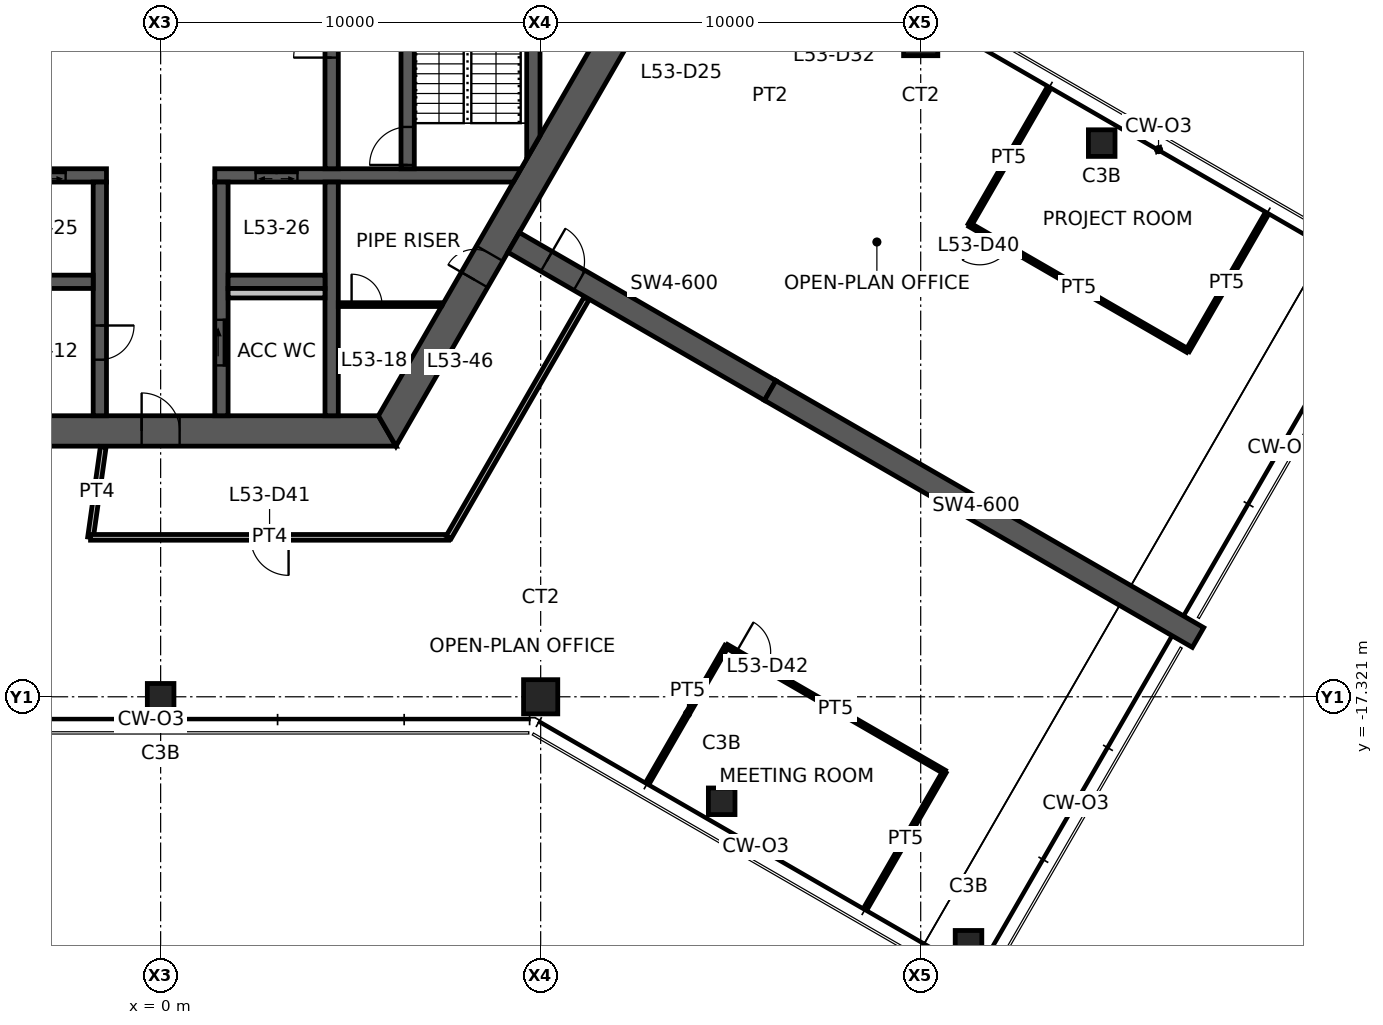
"""IFC4 building model, lengths in metres.
Left out: names, types, materials, properties, quantities, classifications, styles, units other than length and angle.
Written with IfcOpenShell. Run it as: python <this file> out.ifc"""

import sys

from ifc_helpers import new_model, si_unit, direction, frame, frame_2d, origin, origin_2d, place, context, subcontext, project, spatial, polyline, rectangle, hollow_rectangle, outline, extrude, element, fill, save


model = new_model("IFC4")
c1 = context("Model", 3, precision=1e-05, world=origin(), true_north=direction((0.0, 1.0)))
c2 = subcontext(c1, "Body", "Model", "MODEL_VIEW")
j1 = project(units=[si_unit("LENGTHUNIT", "METRE"), si_unit("PLANEANGLEUNIT", "RADIAN")], contexts=[c1])
p1 = place(None, origin())
s1 = spatial("IfcSite", under=j1, at=p1, CompositionType="ELEMENT")
p2 = place(p1, origin())
s2 = spatial("IfcBuilding", under=s1, at=p2, CompositionType="ELEMENT")
p3 = place(p2, frame((0.0, 0.0, 212.8)))
s3 = spatial("IfcBuildingStorey", under=s2, at=p3, CompositionType="ELEMENT", Elevation=212.8)
for number, where, z_axis, x_axis in (
    (1, (20.0, 0.0, 0.0), (0.0, 0.0, 1.0), (1.0, 0.0, 0.0)),
    (2, (10.0, -17.321, 0.0), (0.0, 0.0, 1.0), (1.0, 0.0, 0.0)),
):
    element("IfcColumn", number, at=place(p3, frame(where, z_axis=z_axis, x_axis=x_axis)), inside=s3, PredefinedType="COLUMN", context=c2, shape_type="SweptSolid", body=[
        extrude(hollow_rectangle(XDim=0.9, YDim=0.9, WallThickness=0.09, at=origin_2d()), origin(), (0.0, 0.0, 1.0), 3.9),
    ])
for number, where, z_axis, x_axis in (
    (3, (0.0, -17.321, 0.0), (0.0, 0.0, 1.0), (1.0, 0.0, 0.0)),
    (4, (14.763, -20.071, 0.0), (0.0, 0.0, 1.0), (1.0, 0.0, 0.0)),
    (5, (21.258, -23.821, 0.0), (0.0, 0.0, 1.0), (1.0, 0.0, 0.0)),
    (6, (24.763, -2.75, 0.0), (0.0, 0.0, 1.0), (1.0, 0.0, 0.0)),
):
    element("IfcColumn", number, at=place(p3, frame(where, z_axis=z_axis, x_axis=x_axis)), inside=s3, PredefinedType="COLUMN", context=c2, shape_type="SweptSolid", body=[
        extrude(hollow_rectangle(XDim=0.7, YDim=0.7, WallThickness=0.036, at=origin_2d()), origin(), (0.0, 0.0, 1.0), 3.9),
    ])
p4 = place(p3, frame((-5.961, -10.325, 0.0), z_axis=(0.0, 0.0, 1.0), x_axis=(1.0, 0.0, 0.0)))
e7 = element("IfcWall", 7, at=p4, inside=s3, PredefinedType="SHEAR", context=c2, shape_type="SweptSolid", body=[
    extrude(outline(polyline([(-0.231, -0.4), (5.461, -0.4), (6.461, -0.4), (12.153, -0.4), (11.691, 0.4), (6.461, 0.4), (5.461, 0.4), (0.231, 0.4), (-0.231, -0.4)])), origin(), (0.0, 0.0, 1.0), 3.9),
])
p5 = place(p4, frame((5.461, 0.0, 0.0)))
e8 = element("IfcOpeningElement", 8, at=p5, cuts=e7, PredefinedType="OPENING", context=c2, shape_type="SweptSolid", body=[
    extrude(rectangle(XDim=1.0, YDim=2.1, at=frame_2d((0.5, 1.05))), frame((0.0, 0.41, 0.0), z_axis=(0.0, -1.0, 0.0), x_axis=(1.0, 0.0, 0.0)), (0.0, 0.0, 1.0), 0.82),
])
p6 = place(p3, frame((5.961, -10.325, 0.0), z_axis=(0.0, 0.0, 1.0), x_axis=(0.500004296715, 0.866022923061, 0.0)))
e9 = element("IfcWall", 9, at=p6, inside=s3, PredefinedType="SHEAR", context=c2, shape_type="SweptSolid", body=[
    extrude(outline(polyline([(-0.231, -0.4), (4.594, -0.4), (5.394, -0.4), (12.153, -0.4), (11.691, 0.4), (5.394, 0.4), (4.594, 0.4), (0.231, 0.4), (-0.231, -0.4)])), origin(), (0.0, 0.0, 1.0), 3.9),
])
p7 = place(p6, frame((4.594, 0.0, 0.0)))
e10 = element("IfcOpeningElement", 10, at=p7, cuts=e9, PredefinedType="OPENING", context=c2, shape_type="SweptSolid", body=[
    extrude(rectangle(XDim=0.8, YDim=2.1, at=frame_2d((0.4, 1.05))), frame((0.0, 0.41, 0.0), z_axis=(0.0, -1.0, 0.0), x_axis=(1.0, 0.0, 0.0)), (0.0, 0.0, 1.0), 0.82),
])
p8 = place(p3, frame((9.288, -5.363, 0.0), z_axis=(0.0, 0.0, 1.0), x_axis=(0.866031736626, -0.499989031036, 0.0)))
e11 = element("IfcWall", 11, at=p8, inside=s3, PredefinedType="SHEAR", context=c2, shape_type="SweptSolid", body=[
    extrude(rectangle(XDim=7.796, YDim=0.6, at=frame_2d((3.898, 0.0))), origin(), (0.0, 0.0, 1.0), 3.9),
])
p9 = place(p8, frame((1.0, 0.0, 0.0)))
e12 = element("IfcOpeningElement", 12, at=p9, cuts=e11, PredefinedType="OPENING", context=c2, shape_type="SweptSolid", body=[
    extrude(rectangle(XDim=1.0, YDim=2.1, at=frame_2d((0.5, 1.05))), frame((0.0, 0.31, 0.0), z_axis=(0.0, -1.0, 0.0), x_axis=(1.0, 0.0, 0.0)), (0.0, 0.0, 1.0), 0.62),
])
p10 = place(p3, frame((16.039, -9.26, 0.0), z_axis=(0.0, 0.0, 1.0), x_axis=(0.866024837091, -0.50000098154, 0.0)))
e13 = element("IfcWall", 13, at=p10, inside=s3, PredefinedType="SHEAR", context=c2, shape_type="SweptSolid", body=[
    extrude(rectangle(XDim=13.0, YDim=0.6, at=frame_2d((6.5, 0.0))), origin(), (0.0, 0.0, 1.0), 3.9),
])
p11 = place(p3, frame((-9.382, -3.6, 0.0), z_axis=(0.0, 0.0, 1.0), x_axis=(1.0, 0.0, 0.0)))
e14 = element("IfcWall", 14, at=p11, inside=s3, PredefinedType="SHEAR", context=c2, shape_type="SweptSolid", body=[
    extrude(outline(polyline([(0.101, -0.175), (3.232, -0.175), (4.532, -0.175), (5.782, -0.175), (6.882, -0.175), (7.957, -0.175), (7.957, 0.175), (6.882, 0.175), (5.782, 0.175), (4.532, 0.175), (3.232, 0.175), (-0.101, 0.175), (0.101, -0.175)])), origin(), (0.0, 0.0, 1.0), 3.9),
])
p12 = place(p11, frame((5.782, 0.0, 0.0)))
e15 = element("IfcOpeningElement", 15, at=p12, cuts=e14, PredefinedType="OPENING", context=c2, shape_type="SweptSolid", body=[
    extrude(rectangle(XDim=1.1, YDim=2.1, at=frame_2d((0.55, 1.05))), frame((0.0, 0.185, 0.0), z_axis=(0.0, -1.0, 0.0), x_axis=(1.0, 0.0, 0.0)), (0.0, 0.0, 1.0), 0.37),
])
p13 = place(p11, frame((3.232, 0.0, 0.0)))
e16 = element("IfcOpeningElement", 16, at=p13, cuts=e14, PredefinedType="OPENING", context=c2, shape_type="SweptSolid", body=[
    extrude(rectangle(XDim=1.3, YDim=2.1, at=frame_2d((0.65, 1.05))), frame((0.0, 0.185, 0.0), z_axis=(0.0, -1.0, 0.0), x_axis=(1.0, 0.0, 0.0)), (0.0, 0.0, 1.0), 0.37),
])
p14 = place(p3, frame((1.425, -3.6, 0.0), z_axis=(0.0, 0.0, 1.0), x_axis=(1.0, 0.0, 0.0)))
e17 = element("IfcWall", 17, at=p14, inside=s3, PredefinedType="SHEAR", context=c2, shape_type="SweptSolid", body=[
    extrude(outline(polyline([(0.0, -0.175), (1.075, -0.175), (2.175, -0.175), (7.856, -0.175), (8.058, 0.175), (2.175, 0.175), (1.075, 0.175), (0.0, 0.175), (0.0, -0.175)])), origin(), (0.0, 0.0, 1.0), 3.9),
])
p15 = place(p14, frame((1.075, 0.0, 0.0)))
e18 = element("IfcOpeningElement", 18, at=p15, cuts=e17, PredefinedType="OPENING", context=c2, shape_type="SweptSolid", body=[
    extrude(rectangle(XDim=1.1, YDim=2.1, at=frame_2d((0.55, 1.05))), frame((0.0, 0.185, 0.0), z_axis=(0.0, -1.0, 0.0), x_axis=(1.0, 0.0, 0.0)), (0.0, 0.0, 1.0), 0.37),
])
p16 = place(p3, frame((-1.6, -3.775, 0.0), z_axis=(0.0, 0.0, 1.0), x_axis=(0.0, -1.0, 0.0)))
e19 = element("IfcWall", 19, at=p16, inside=s3, PredefinedType="SHEAR", context=c2, shape_type="SweptSolid", body=[
    extrude(rectangle(XDim=6.15, YDim=0.35, at=frame_2d((3.075, 0.0))), origin(), (0.0, 0.0, 1.0), 3.9),
])
p17 = place(p16, frame((3.775, 0.0, 0.0)))
e20 = element("IfcOpeningElement", 20, at=p17, cuts=e19, PredefinedType="OPENING", context=c2, shape_type="SweptSolid", body=[
    extrude(rectangle(XDim=0.9, YDim=2.1, at=frame_2d((0.45, 1.05))), frame((0.0, 0.185, 0.0), z_axis=(0.0, -1.0, 0.0), x_axis=(1.0, 0.0, 0.0)), (0.0, 0.0, 1.0), 0.37),
])
p18 = place(p3, frame((1.6, -3.775, 0.0), z_axis=(0.0, 0.0, 1.0), x_axis=(0.0, -1.0, 0.0)))
e21 = element("IfcWall", 21, at=p18, inside=s3, PredefinedType="SHEAR", context=c2, shape_type="SweptSolid", body=[
    extrude(rectangle(XDim=6.15, YDim=0.35, at=frame_2d((3.075, 0.0))), origin(), (0.0, 0.0, 1.0), 3.9),
])
p19 = place(p18, frame((3.625, 0.0, 0.0)))
e22 = element("IfcOpeningElement", 22, at=p19, cuts=e21, PredefinedType="OPENING", context=c2, shape_type="SweptSolid", body=[
    extrude(rectangle(XDim=1.2, YDim=2.1, at=frame_2d((0.6, 1.05))), frame((0.0, 0.185, 0.0), z_axis=(0.0, -1.0, 0.0), x_axis=(1.0, 0.0, 0.0)), (0.0, 0.0, 1.0), 0.37),
])
p20 = place(p3, frame((4.5, -3.425, 0.0), z_axis=(0.0, 0.0, 1.0), x_axis=(0.0, 1.0, 0.0)))
e23 = element("IfcWall", 23, at=p20, inside=s3, PredefinedType="SHEAR", context=c2, shape_type="SweptSolid", body=[
    extrude(rectangle(XDim=6.85, YDim=0.35, at=frame_2d((3.425, 0.0))), origin(), (0.0, 0.0, 1.0), 3.9),
])
p21 = place(p20, frame((2.925, 0.0, 0.0)))
e24 = element("IfcOpeningElement", 24, at=p21, cuts=e23, PredefinedType="OPENING", context=c2, shape_type="SweptSolid", body=[
    extrude(rectangle(XDim=1.0, YDim=2.1, at=frame_2d((0.5, 1.05))), frame((0.0, 0.185, 0.0), z_axis=(0.0, -1.0, 0.0), x_axis=(1.0, 0.0, 0.0)), (0.0, 0.0, 1.0), 0.37),
])
p22 = place(p3, frame((6.5, -3.425, 0.0), z_axis=(0.0, 0.0, 1.0), x_axis=(0.0, 1.0, 0.0)))
e25 = element("IfcWall", 25, at=p22, inside=s3, PredefinedType="SHEAR", context=c2, shape_type="SweptSolid", body=[
    extrude(rectangle(XDim=6.85, YDim=0.35, at=frame_2d((3.425, 0.0))), origin(), (0.0, 0.0, 1.0), 3.9),
])
p23 = place(p22, frame((0.1, 0.0, 0.0)))
e26 = element("IfcOpeningElement", 26, at=p23, cuts=e25, PredefinedType="OPENING", context=c2, shape_type="SweptSolid", body=[
    extrude(rectangle(XDim=1.0, YDim=2.1, at=frame_2d((0.5, 1.05))), frame((0.0, 0.185, 0.0), z_axis=(0.0, -1.0, 0.0), x_axis=(1.0, 0.0, 0.0)), (0.0, 0.0, 1.0), 0.37),
])
p24 = place(p3, frame((4.5, -3.775, 0.0), z_axis=(0.0, 0.0, 1.0), x_axis=(0.0, -1.0, 0.0)))
e27 = element("IfcWall", 27, at=p24, inside=s3, PredefinedType="SHEAR", context=c2, shape_type="SweptSolid", body=[
    extrude(rectangle(XDim=6.15, YDim=0.35, at=frame_2d((3.075, 0.0))), origin(), (0.0, 0.0, 1.0), 3.9),
])
for number, where, z_axis, x_axis in (
    (28, (-4.325, -6.4, 0.0), (0.0, 0.0, 1.0), (1.0, 0.0, 0.0)),
    (29, (1.775, -6.4, 0.0), (0.0, 0.0, 1.0), (1.0, 0.0, 0.0)),
):
    element("IfcWall", number, at=place(p3, frame(where, z_axis=z_axis, x_axis=x_axis)), inside=s3, PredefinedType="SHEAR", context=c2, shape_type="SweptSolid", body=[
        extrude(rectangle(XDim=2.55, YDim=0.35, at=frame_2d((1.275, 0.0))), origin(), (0.0, 0.0, 1.0), 3.9),
    ])
p25 = place(p3, frame((9.808, -2.862, 0.0), z_axis=(0.0, 0.0, 1.0), x_axis=(0.0, 1.0, 0.0)))
e30 = element("IfcWall", 30, at=p25, inside=s3, PredefinedType="SHEAR", context=c2, shape_type="SweptSolid", body=[
    extrude(outline(polyline([(0.303, -0.175), (5.421, -0.175), (6.028, 0.175), (-0.303, 0.175), (0.303, -0.175)])), origin(), (0.0, 0.0, 1.0), 3.9),
])
p26 = place(p3, frame((1.775, -6.7, 0.0), z_axis=(0.0, 0.0, 1.0), x_axis=(1.0, 0.0, 0.0)))
e31 = element("IfcWall", 31, at=p26, inside=s3, PredefinedType="PLUMBINGWALL", context=c2, shape_type="SweptSolid", body=[
    extrude(rectangle(XDim=2.55, YDim=0.25, at=frame_2d((1.275, 0.0))), origin(), (0.0, 0.0, 1.0), 3.9),
])
p27 = place(p3, frame((4.675, -7.0, 0.0), z_axis=(0.0, 0.0, 1.0), x_axis=(1.0, 0.0, 0.0)))
e32 = element("IfcWall", 32, at=p27, inside=s3, PredefinedType="PARTITIONING", context=c2, shape_type="SweptSolid", body=[
    extrude(outline(polyline([(0.0, -0.05), (0.35, -0.05), (1.15, -0.05), (2.715, -0.05), (2.744, 0.0), (2.75, 0.05), (1.15, 0.05), (0.35, 0.05), (0.0, 0.05), (0.0, -0.05)])), origin(), (0.0, 0.0, 1.0), 2.95),
])
p28 = place(p27, frame((0.35, 0.0, 0.0)))
e33 = element("IfcOpeningElement", 33, at=p28, cuts=e32, PredefinedType="OPENING", context=c2, shape_type="SweptSolid", body=[
    extrude(rectangle(XDim=0.8, YDim=2.1, at=frame_2d((0.4, 1.05))), frame((0.0, 0.06, 0.0), z_axis=(0.0, -1.0, 0.0), x_axis=(1.0, 0.0, 0.0)), (0.0, 0.0, 1.0), 0.12),
])
p29 = place(p3, frame((21.292, -4.903, 0.0), z_axis=(0.0, 0.0, 1.0), x_axis=(0.500000428765, 0.866025156237, 0.0)))
e34 = element("IfcWall", 34, at=p29, inside=s3, PredefinedType="PARTITIONING", context=c2, shape_type="SweptSolid", body=[
    extrude(rectangle(XDim=4.08, YDim=0.1, at=frame_2d((2.04, 0.0))), origin(), (0.0, 0.0, 1.0), 2.95),
])
p30 = place(p3, frame((27.025, -8.213, 0.0), z_axis=(0.0, 0.0, 1.0), x_axis=(-0.866021597574, 0.500006592492, 0.0)))
e35 = element("IfcWall", 35, at=p30, inside=s3, PredefinedType="PARTITIONING", context=c2, shape_type="SweptSolid", body=[
    extrude(rectangle(XDim=6.62, YDim=0.1, at=frame_2d((3.31, 0.0))), origin(), (0.0, 0.0, 1.0), 2.95),
])
p31 = place(p30, frame((5.42, 0.0, 0.0)))
e36 = element("IfcOpeningElement", 36, at=p31, cuts=e35, PredefinedType="OPENING", context=c2, shape_type="SweptSolid", body=[
    extrude(rectangle(XDim=0.9, YDim=2.1, at=frame_2d((0.45, 1.05))), frame((0.0, 0.06, 0.0), z_axis=(0.0, -1.0, 0.0), x_axis=(1.0, 0.0, 0.0)), (0.0, 0.0, 1.0), 0.12),
])
p32 = place(p3, frame((29.08, -4.653, 0.0), z_axis=(0.0, 0.0, 1.0), x_axis=(-0.500010383074, -0.866019409031, 0.0)))
e37 = element("IfcWall", 37, at=p32, inside=s3, PredefinedType="PARTITIONING", context=c2, shape_type="SweptSolid", body=[
    extrude(rectangle(XDim=4.11, YDim=0.1, at=frame_2d((2.055, 0.0))), origin(), (0.0, 0.0, 1.0), 2.95),
])
p33 = place(p3, frame((-1.844, -13.125, 0.0), z_axis=(0.0, 0.0, 1.0), x_axis=(0.139173892267, 0.99026795753, 0.0)))
e38 = element("IfcWall", 38, at=p33, inside=s3, PredefinedType="PARTITIONING", context=c2, shape_type="SweptSolid", body=[
    extrude(rectangle(XDim=2.403, YDim=0.15, at=frame_2d((1.202, 0.0))), origin(), (0.0, 0.0, 1.0), 2.95),
])
p34 = place(p3, frame((7.578, -13.125, 0.0), z_axis=(0.0, 0.0, 1.0), x_axis=(-1.0, 0.0, 0.0)))
e39 = element("IfcWall", 39, at=p34, inside=s3, PredefinedType="PARTITIONING", context=c2, shape_type="SweptSolid", body=[
    extrude(rectangle(XDim=9.422, YDim=0.15, at=frame_2d((4.711, 0.0))), origin(), (0.0, 0.0, 1.0), 2.95),
])
p35 = place(p34, frame((4.211, 0.0, 0.0)))
e40 = element("IfcOpeningElement", 40, at=p35, cuts=e39, PredefinedType="OPENING", context=c2, shape_type="SweptSolid", body=[
    extrude(rectangle(XDim=1.0, YDim=2.1, at=frame_2d((0.5, 1.05))), frame((0.0, 0.085, 0.0), z_axis=(0.0, -1.0, 0.0), x_axis=(1.0, 0.0, 0.0)), (0.0, 0.0, 1.0), 0.17),
])
p36 = place(p3, frame((11.207, -6.84, 0.0), z_axis=(0.0, 0.0, 1.0), x_axis=(-0.500002959843, -0.866023694911, 0.0)))
e41 = element("IfcWall", 41, at=p36, inside=s3, PredefinedType="PARTITIONING", context=c2, shape_type="SweptSolid", body=[
    extrude(rectangle(XDim=7.258, YDim=0.15, at=frame_2d((3.629, 0.0))), origin(), (0.0, 0.0, 1.0), 2.95),
])
p37 = place(p3, frame((12.837, -19.548, 0.0), z_axis=(0.0, 0.0, 1.0), x_axis=(0.499965833383, 0.866045128991, 0.0)))
e42 = element("IfcWall", 42, at=p37, inside=s3, PredefinedType="PARTITIONING", context=c2, shape_type="SweptSolid", body=[
    extrude(rectangle(XDim=4.11, YDim=0.1, at=frame_2d((2.055, 0.0))), origin(), (0.0, 0.0, 1.0), 2.95),
])
p38 = place(p3, frame((14.892, -15.988, 0.0), z_axis=(0.0, 0.0, 1.0), x_axis=(0.866030817826, -0.499990622488, 0.0)))
e43 = element("IfcWall", 43, at=p38, inside=s3, PredefinedType="PARTITIONING", context=c2, shape_type="SweptSolid", body=[
    extrude(rectangle(XDim=6.62, YDim=0.1, at=frame_2d((3.31, 0.0))), origin(), (0.0, 0.0, 1.0), 2.95),
])
p39 = place(p38, frame((0.3, 0.0, 0.0)))
e44 = element("IfcOpeningElement", 44, at=p39, cuts=e43, PredefinedType="OPENING", context=c2, shape_type="SweptSolid", body=[
    extrude(rectangle(XDim=0.9, YDim=2.1, at=frame_2d((0.45, 1.05))), frame((0.0, 0.06, 0.0), z_axis=(0.0, -1.0, 0.0), x_axis=(1.0, 0.0, 0.0)), (0.0, 0.0, 1.0), 0.12),
])
p40 = place(p3, frame((20.625, -19.298, 0.0), z_axis=(0.0, 0.0, 1.0), x_axis=(-0.500000428765, -0.866025156237, 0.0)))
e45 = element("IfcWall", 45, at=p40, inside=s3, PredefinedType="PARTITIONING", context=c2, shape_type="SweptSolid", body=[
    extrude(rectangle(XDim=4.08, YDim=0.1, at=frame_2d((2.04, 0.0))), origin(), (0.0, 0.0, 1.0), 2.95),
])
p41 = place(p5, origin())
e46 = element("IfcDoor", 46, at=p41, inside=s3, OperationType="SINGLE_SWING_LEFT", PredefinedType="DOOR", context=c2, shape_type="SweptSolid", body=[
    extrude(rectangle(XDim=1.0, YDim=2.1, at=frame_2d((0.5, 1.05))), frame((0.0, 0.025, 0.0), z_axis=(0.0, -1.0, 0.0), x_axis=(1.0, 0.0, 0.0)), (0.0, 0.0, 1.0), 0.05),
])
fill(e8, e46)
p42 = place(p7, origin())
e47 = element("IfcDoor", 47, at=p42, inside=s3, OperationType="SINGLE_SWING_LEFT", PredefinedType="DOOR", context=c2, shape_type="SweptSolid", body=[
    extrude(rectangle(XDim=0.8, YDim=2.1, at=frame_2d((0.4, 1.05))), frame((0.0, 0.025, 0.0), z_axis=(0.0, -1.0, 0.0), x_axis=(1.0, 0.0, 0.0)), (0.0, 0.0, 1.0), 0.05),
])
fill(e10, e47)
p43 = place(p21, origin())
e48 = element("IfcDoor", 48, at=p43, inside=s3, OperationType="SINGLE_SWING_LEFT", PredefinedType="DOOR", context=c2, shape_type="SweptSolid", body=[
    extrude(rectangle(XDim=1.0, YDim=2.1, at=frame_2d((0.5, 1.05))), frame((0.0, 0.025, 0.0), z_axis=(0.0, -1.0, 0.0), x_axis=(1.0, 0.0, 0.0)), (0.0, 0.0, 1.0), 0.05),
])
fill(e24, e48)
p44 = place(p23, origin())
e49 = element("IfcDoor", 49, at=p44, inside=s3, OperationType="SINGLE_SWING_LEFT", PredefinedType="DOOR", context=c2, shape_type="SweptSolid", body=[
    extrude(rectangle(XDim=1.0, YDim=2.1, at=frame_2d((0.5, 1.05))), frame((0.0, 0.025, 0.0), z_axis=(0.0, -1.0, 0.0), x_axis=(1.0, 0.0, 0.0)), (0.0, 0.0, 1.0), 0.05),
])
fill(e26, e49)
p45 = place(p19, origin())
e50 = element("IfcDoor", 50, at=p45, inside=s3, OperationType="SLIDING_TO_LEFT", PredefinedType="DOOR", context=c2, shape_type="SweptSolid", body=[
    extrude(rectangle(XDim=1.2, YDim=2.1, at=frame_2d((0.6, 1.05))), frame((0.0, 0.025, 0.0), z_axis=(0.0, -1.0, 0.0), x_axis=(1.0, 0.0, 0.0)), (0.0, 0.0, 1.0), 0.05),
])
fill(e22, e50)
p46 = place(p17, origin())
e51 = element("IfcDoor", 51, at=p46, inside=s3, OperationType="SINGLE_SWING_LEFT", PredefinedType="DOOR", context=c2, shape_type="SweptSolid", body=[
    extrude(rectangle(XDim=0.9, YDim=2.1, at=frame_2d((0.45, 1.05))), frame((0.0, 0.025, 0.0), z_axis=(0.0, -1.0, 0.0), x_axis=(1.0, 0.0, 0.0)), (0.0, 0.0, 1.0), 0.05),
])
fill(e20, e51)
p47 = place(p9, origin())
e52 = element("IfcDoor", 52, at=p47, inside=s3, OperationType="SINGLE_SWING_LEFT", PredefinedType="DOOR", context=c2, shape_type="SweptSolid", body=[
    extrude(rectangle(XDim=1.0, YDim=2.1, at=frame_2d((0.5, 1.05))), frame((0.0, 0.025, 0.0), z_axis=(0.0, -1.0, 0.0), x_axis=(1.0, 0.0, 0.0)), (0.0, 0.0, 1.0), 0.05),
])
fill(e12, e52)
p48 = place(p28, origin())
e53 = element("IfcDoor", 53, at=p48, inside=s3, OperationType="SINGLE_SWING_LEFT", PredefinedType="DOOR", context=c2, shape_type="SweptSolid", body=[
    extrude(rectangle(XDim=0.8, YDim=2.1, at=frame_2d((0.4, 1.05))), frame((0.0, 0.025, 0.0), z_axis=(0.0, -1.0, 0.0), x_axis=(1.0, 0.0, 0.0)), (0.0, 0.0, 1.0), 0.05),
])
fill(e33, e53)
p49 = place(p31, origin())
e54 = element("IfcDoor", 54, at=p49, inside=s3, OperationType="SINGLE_SWING_RIGHT", PredefinedType="DOOR", context=c2, shape_type="SweptSolid", body=[
    extrude(rectangle(XDim=0.9, YDim=2.1, at=frame_2d((0.45, 1.05))), frame((0.0, 0.025, 0.0), z_axis=(0.0, -1.0, 0.0), x_axis=(1.0, 0.0, 0.0)), (0.0, 0.0, 1.0), 0.05),
])
fill(e36, e54)
p50 = place(p35, origin())
e55 = element("IfcDoor", 55, at=p50, inside=s3, OperationType="SINGLE_SWING_LEFT", PredefinedType="DOOR", context=c2, shape_type="SweptSolid", body=[
    extrude(rectangle(XDim=1.0, YDim=2.1, at=frame_2d((0.5, 1.05))), frame((0.0, 0.025, 0.0), z_axis=(0.0, -1.0, 0.0), x_axis=(1.0, 0.0, 0.0)), (0.0, 0.0, 1.0), 0.05),
])
fill(e40, e55)
p51 = place(p39, origin())
e56 = element("IfcDoor", 56, at=p51, inside=s3, OperationType="SINGLE_SWING_LEFT", PredefinedType="DOOR", context=c2, shape_type="SweptSolid", body=[
    extrude(rectangle(XDim=0.9, YDim=2.1, at=frame_2d((0.45, 1.05))), frame((0.0, 0.025, 0.0), z_axis=(0.0, -1.0, 0.0), x_axis=(1.0, 0.0, 0.0)), (0.0, 0.0, 1.0), 0.05),
])
fill(e44, e56)
p52 = place(p15, origin())
e57 = element("IfcDoor", 57, at=p52, inside=s3, OperationType="DOUBLE_DOOR_SLIDING", PredefinedType="DOOR", context=c2, shape_type="SweptSolid", body=[
    extrude(rectangle(XDim=1.1, YDim=2.1, at=frame_2d((0.55, 1.05))), frame((0.0, 0.025, 0.0), z_axis=(0.0, -1.0, 0.0), x_axis=(1.0, 0.0, 0.0)), (0.0, 0.0, 1.0), 0.05),
])
fill(e18, e57)
p53 = place(p12, origin())
e58 = element("IfcDoor", 58, at=p53, inside=s3, OperationType="DOUBLE_DOOR_SLIDING", PredefinedType="DOOR", context=c2, shape_type="SweptSolid", body=[
    extrude(rectangle(XDim=1.1, YDim=2.1, at=frame_2d((0.55, 1.05))), frame((0.0, 0.025, 0.0), z_axis=(0.0, -1.0, 0.0), x_axis=(1.0, 0.0, 0.0)), (0.0, 0.0, 1.0), 0.05),
])
fill(e15, e58)
save(model, sys.argv[1])
